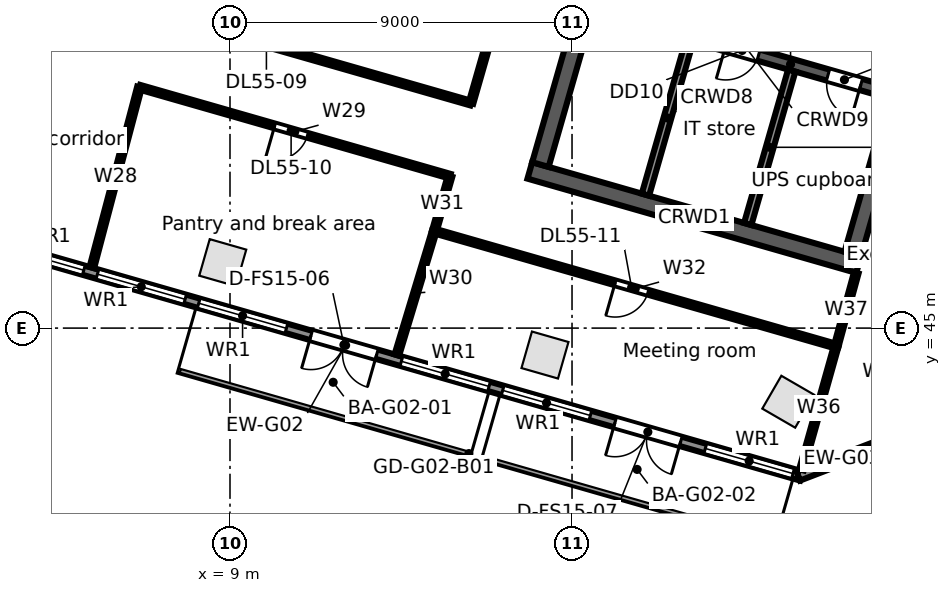
"""IFC4 building model, lengths in metres.
Left out: names, types, materials, properties, quantities, classifications, styles, units other than length and angle.
Written with IfcOpenShell. Run it as: python <this file> out.ifc"""

import sys

from ifc_helpers import new_model, si_unit, direction, frame, frame_2d, origin, origin_2d, place, context, subcontext, project, spatial, rectangle, extrude, element, fill, save


model = new_model("IFC4")
c1 = context("Model", 3, precision=1e-05, world=origin(), true_north=direction((0.0, 1.0)))
c2 = subcontext(c1, "Body", "Model", "MODEL_VIEW")
j1 = project(units=[si_unit("LENGTHUNIT", "METRE"), si_unit("PLANEANGLEUNIT", "RADIAN")], contexts=[c1])
p1 = place(None, origin())
s1 = spatial("IfcSite", under=j1, at=p1, CompositionType="ELEMENT")
p2 = place(p1, origin())
s2 = spatial("IfcBuilding", under=s1, at=p2, CompositionType="ELEMENT")
p3 = place(p2, frame((0.0, 0.0, 250.4)))
s3 = spatial("IfcBuildingStorey", under=s2, at=p3, CompositionType="ELEMENT", Elevation=250.4)
for number, where, z_axis, x_axis in (
    (1, (8.81, 46.722, 0.0), (0.0, 0.0, 1.0), (0.961, -0.276, 0.0)),
    (2, (17.288, 44.291, 0.0), (0.0, 0.0, 1.0), (0.961, -0.276, 0.0)),
    (3, (23.69, 43.063, 0.0), (0.0, 0.0, 1.0), (-0.865, 0.501, 0.0)),
):
    element("IfcColumn", number, at=place(p3, frame(where, z_axis=z_axis, x_axis=x_axis)), inside=s3, PredefinedType="COLUMN", context=c2, shape_type="SweptSolid", body=[
        extrude(rectangle(XDim=1.0, YDim=1.0, at=origin_2d()), origin(), (0.0, 0.0, 1.0), 3.9),
    ])
p4 = place(p3, frame((24.034, 41.108, 0.0), z_axis=(0.0, 0.0, 1.0), x_axis=(-0.96126060691, 0.275641153683, 0.0)))
e4 = element("IfcWall", 4, at=p4, inside=s3, PredefinedType="STANDARD", context=c2, shape_type="SweptSolid", body=[
    extrude(rectangle(XDim=24.951, YDim=0.25, at=frame_2d((12.475, 0.0))), origin(), (0.0, 0.0, 1.0), 3.62),
])
p5 = place(p4, frame((22.416, 0.0, 0.8)))
e5 = element("IfcOpeningElement", 5, at=p5, cuts=e4, PredefinedType="OPENING", context=c2, shape_type="SweptSolid", body=[
    extrude(rectangle(XDim=2.4, YDim=2.2, at=frame_2d((1.2, 1.1))), frame((0.0, 0.135, 0.0), z_axis=(0.0, -1.0, 0.0), x_axis=(1.0, 0.0, 0.0)), (0.0, 0.0, 1.0), 0.27),
])
p6 = place(p4, frame((19.643, 0.0, 0.8)))
e6 = element("IfcOpeningElement", 6, at=p6, cuts=e4, PredefinedType="OPENING", context=c2, shape_type="SweptSolid", body=[
    extrude(rectangle(XDim=2.4, YDim=2.2, at=frame_2d((1.2, 1.1))), frame((0.0, 0.135, 0.0), z_axis=(0.0, -1.0, 0.0), x_axis=(1.0, 0.0, 0.0)), (0.0, 0.0, 1.0), 0.27),
])
p7 = place(p4, frame((16.869, 0.0, 0.8)))
e7 = element("IfcOpeningElement", 7, at=p7, cuts=e4, PredefinedType="OPENING", context=c2, shape_type="SweptSolid", body=[
    extrude(rectangle(XDim=2.4, YDim=2.2, at=frame_2d((1.2, 1.1))), frame((0.0, 0.135, 0.0), z_axis=(0.0, -1.0, 0.0), x_axis=(1.0, 0.0, 0.0)), (0.0, 0.0, 1.0), 0.27),
])
p8 = place(p4, frame((14.096, 0.0, 0.8)))
e8 = element("IfcOpeningElement", 8, at=p8, cuts=e4, PredefinedType="OPENING", context=c2, shape_type="SweptSolid", body=[
    extrude(rectangle(XDim=2.4, YDim=2.2, at=frame_2d((1.2, 1.1))), frame((0.0, 0.135, 0.0), z_axis=(0.0, -1.0, 0.0), x_axis=(1.0, 0.0, 0.0)), (0.0, 0.0, 1.0), 0.27),
])
p9 = place(p4, frame((11.622, 0.0, 0.0)))
e9 = element("IfcOpeningElement", 9, at=p9, cuts=e4, PredefinedType="OPENING", context=c2, shape_type="SweptSolid", body=[
    extrude(rectangle(XDim=1.8, YDim=2.4, at=frame_2d((0.9, 1.2))), frame((0.0, 0.135, 0.0), z_axis=(0.0, -1.0, 0.0), x_axis=(1.0, 0.0, 0.0)), (0.0, 0.0, 1.0), 0.27),
])
p10 = place(p4, frame((8.549, 0.0, 0.8)))
e10 = element("IfcOpeningElement", 10, at=p10, cuts=e4, PredefinedType="OPENING", context=c2, shape_type="SweptSolid", body=[
    extrude(rectangle(XDim=2.4, YDim=2.2, at=frame_2d((1.2, 1.1))), frame((0.0, 0.135, 0.0), z_axis=(0.0, -1.0, 0.0), x_axis=(1.0, 0.0, 0.0)), (0.0, 0.0, 1.0), 0.27),
])
p11 = place(p4, frame((5.775, 0.0, 0.8)))
e11 = element("IfcOpeningElement", 11, at=p11, cuts=e4, PredefinedType="OPENING", context=c2, shape_type="SweptSolid", body=[
    extrude(rectangle(XDim=2.4, YDim=2.2, at=frame_2d((1.2, 1.1))), frame((0.0, 0.135, 0.0), z_axis=(0.0, -1.0, 0.0), x_axis=(1.0, 0.0, 0.0)), (0.0, 0.0, 1.0), 0.27),
])
p12 = place(p4, frame((3.302, 0.0, 0.0)))
e12 = element("IfcOpeningElement", 12, at=p12, cuts=e4, PredefinedType="OPENING", context=c2, shape_type="SweptSolid", body=[
    extrude(rectangle(XDim=1.8, YDim=2.4, at=frame_2d((0.9, 1.2))), frame((0.0, 0.135, 0.0), z_axis=(0.0, -1.0, 0.0), x_axis=(1.0, 0.0, 0.0)), (0.0, 0.0, 1.0), 0.27),
])
p13 = place(p4, frame((0.229, 0.0, 0.8)))
e13 = element("IfcOpeningElement", 13, at=p13, cuts=e4, PredefinedType="OPENING", context=c2, shape_type="SweptSolid", body=[
    extrude(rectangle(XDim=2.4, YDim=2.2, at=frame_2d((1.2, 1.1))), frame((0.0, 0.135, 0.0), z_axis=(0.0, -1.0, 0.0), x_axis=(1.0, 0.0, 0.0)), (0.0, 0.0, 1.0), 0.27),
])
p14 = place(p3, frame((26.27, 41.993, 0.0), z_axis=(0.0, 0.0, 1.0), x_axis=(-0.933573798066, -0.358385216722, 0.0)))
e14 = element("IfcWall", 14, at=p14, inside=s3, PredefinedType="STANDARD", context=c2, shape_type="SweptSolid", body=[
    extrude(rectangle(XDim=2.48, YDim=0.25, at=frame_2d((1.24, 0.0))), origin(), (0.0, 0.0, 1.0), 3.62),
])
p15 = place(p3, frame((16.89, 49.149, 0.0), z_axis=(0.0, 0.0, 1.0), x_axis=(0.96126248289, -0.275634611374, 0.0)))
e15 = element("IfcWall", 15, at=p15, inside=s3, PredefinedType="SOLIDWALL", context=c2, shape_type="SweptSolid", body=[
    extrude(rectangle(XDim=9.0, YDim=0.45, at=frame_2d((4.5, 0.0))), origin(), (0.0, 0.0, 1.0), 3.62),
])
p16 = place(p3, frame((21.131, 52.692, 0.0), z_axis=(0.0, 0.0, 1.0), x_axis=(0.961261488075, -0.275638080722, 0.0)))
e16 = element("IfcWall", 16, at=p16, inside=s3, PredefinedType="SOLIDWALL", context=c2, shape_type="SweptSolid", body=[
    extrude(rectangle(XDim=5.45, YDim=0.3, at=frame_2d((2.725, 0.0))), origin(), (0.0, 0.0, 1.0), 3.62),
])
p17 = place(p16, frame((0.95, 0.0, 0.0)))
e17 = element("IfcOpeningElement", 17, at=p17, cuts=e16, PredefinedType="OPENING", context=c2, shape_type="SweptSolid", body=[
    extrude(rectangle(XDim=0.9, YDim=2.1, at=frame_2d((0.45, 1.05))), frame((0.0, 0.16, 0.0), z_axis=(0.0, -1.0, 0.0), x_axis=(1.0, 0.0, 0.0)), (0.0, 0.0, 1.0), 0.32),
])
p18 = place(p16, frame((3.75, 0.0, 0.0)))
e18 = element("IfcOpeningElement", 18, at=p18, cuts=e16, PredefinedType="OPENING", context=c2, shape_type="SweptSolid", body=[
    extrude(rectangle(XDim=0.9, YDim=2.1, at=frame_2d((0.45, 1.05))), frame((0.0, 0.16, 0.0), z_axis=(0.0, -1.0, 0.0), x_axis=(1.0, 0.0, 0.0)), (0.0, 0.0, 1.0), 0.32),
])
p19 = place(p3, frame((17.168, 49.303, 0.0), z_axis=(0.0, 0.0, 1.0), x_axis=(0.275638974822, 0.961261231695, 0.0)))
e19 = element("IfcWall", 19, at=p19, inside=s3, PredefinedType="SOLIDWALL", context=c2, shape_type="SweptSolid", body=[
    extrude(rectangle(XDim=11.1, YDim=0.45, at=frame_2d((5.55, 0.0))), origin(), (0.0, 0.0, 1.0), 3.62),
])
p20 = place(p19, frame((4.95, 0.0, 0.0)))
e20 = element("IfcOpeningElement", 20, at=p20, cuts=e19, PredefinedType="OPENING", context=c2, shape_type="SweptSolid", body=[
    extrude(rectangle(XDim=1.2, YDim=2.1, at=frame_2d((0.6, 1.05))), frame((0.0, 0.235, 0.0), z_axis=(0.0, -1.0, 0.0), x_axis=(1.0, 0.0, 0.0)), (0.0, 0.0, 1.0), 0.47),
])
p21 = place(p3, frame((19.932, 48.511, 0.0), z_axis=(0.0, 0.0, 1.0), x_axis=(0.275642273411, 0.961260285827, 0.0)))
e21 = element("IfcWall", 21, at=p21, inside=s3, PredefinedType="SOLIDWALL", context=c2, shape_type="SweptSolid", body=[
    extrude(rectangle(XDim=4.2, YDim=0.2, at=frame_2d((2.1, 0.0))), origin(), (0.0, 0.0, 1.0), 3.62),
])
p22 = place(p3, frame((22.623, 47.739, 0.0), z_axis=(0.0, 0.0, 1.0), x_axis=(0.275642273411, 0.961260285827, 0.0)))
e22 = element("IfcWall", 22, at=p22, inside=s3, PredefinedType="PARTITIONING", context=c2, shape_type="SweptSolid", body=[
    extrude(rectangle(XDim=4.2, YDim=0.2, at=frame_2d((2.1, 0.0))), origin(), (0.0, 0.0, 1.0), 3.62),
])
p23 = place(p3, frame((25.387, 46.947, 0.0), z_axis=(0.0, 0.0, 1.0), x_axis=(0.275638974822, 0.961261231695, 0.0)))
e23 = element("IfcWall", 23, at=p23, inside=s3, PredefinedType="SOLIDWALL", context=c2, shape_type="SweptSolid", body=[
    extrude(rectangle(XDim=11.1, YDim=0.45, at=frame_2d((5.55, 0.0))), origin(), (0.0, 0.0, 1.0), 3.62),
])
p24 = place(p23, frame((4.95, 0.0, 0.0)))
e24 = element("IfcOpeningElement", 24, at=p24, cuts=e23, PredefinedType="OPENING", context=c2, shape_type="SweptSolid", body=[
    extrude(rectangle(XDim=1.2, YDim=2.1, at=frame_2d((0.6, 1.05))), frame((0.0, 0.235, 0.0), z_axis=(0.0, -1.0, 0.0), x_axis=(1.0, 0.0, 0.0)), (0.0, 0.0, 1.0), 0.47),
])
p25 = place(p3, frame((4.527, 54.02, 0.0), z_axis=(0.0, 0.0, 1.0), x_axis=(0.961279520283, -0.275575187352, 0.0)))
e25 = element("IfcWall", 25, at=p25, inside=s3, PredefinedType="PARTITIONING", context=c2, shape_type="SweptSolid", body=[
    extrude(rectangle(XDim=11.25, YDim=0.125, at=frame_2d((5.625, 0.0))), origin(), (0.0, 0.0, 1.0), 2.8),
])
p26 = place(p25, frame((5.2, 0.0, 0.0)))
e26 = element("IfcOpeningElement", 26, at=p26, cuts=e25, PredefinedType="OPENING", context=c2, shape_type="SweptSolid", body=[
    extrude(rectangle(XDim=0.9, YDim=2.1, at=frame_2d((0.45, 1.05))), frame((0.0, 0.073, 0.0), z_axis=(0.0, -1.0, 0.0), x_axis=(1.0, 0.0, 0.0)), (0.0, 0.0, 1.0), 0.145),
])
p27 = place(p3, frame((5.364, 46.592, 0.0), z_axis=(0.0, 0.0, 1.0), x_axis=(0.255520885185, 0.966803536006, 0.0)))
e27 = element("IfcWall", 27, at=p27, inside=s3, PredefinedType="PARTITIONING", context=c2, shape_type="SweptSolid", body=[
    extrude(rectangle(XDim=4.911, YDim=0.125, at=frame_2d((2.456, 0.0))), origin(), (0.0, 0.0, 1.0), 2.988),
])
p28 = place(p3, frame((6.619, 51.34, 0.0), z_axis=(0.0, 0.0, 1.0), x_axis=(0.961262314742, -0.275635197782, 0.0)))
e28 = element("IfcWall", 28, at=p28, inside=s3, PredefinedType="PARTITIONING", context=c2, shape_type="SweptSolid", body=[
    extrude(rectangle(XDim=8.5, YDim=0.125, at=frame_2d((4.25, 0.0))), origin(), (0.0, 0.0, 1.0), 2.8),
])
p29 = place(p28, frame((3.7, 0.0, 0.0)))
e29 = element("IfcOpeningElement", 29, at=p29, cuts=e28, PredefinedType="OPENING", context=c2, shape_type="SweptSolid", body=[
    extrude(rectangle(XDim=0.9, YDim=2.1, at=frame_2d((0.45, 1.05))), frame((0.0, 0.073, 0.0), z_axis=(0.0, -1.0, 0.0), x_axis=(1.0, 0.0, 0.0)), (0.0, 0.0, 1.0), 0.145),
])
p30 = place(p3, frame((13.39, 44.29, 0.0), z_axis=(0.0, 0.0, 1.0), x_axis=(0.289389501276, 0.957211427299, 0.0)))
e30 = element("IfcWall", 30, at=p30, inside=s3, PredefinedType="PARTITIONING", context=c2, shape_type="SweptSolid", body=[
    extrude(rectangle(XDim=3.411, YDim=0.125, at=frame_2d((1.706, 0.0))), origin(), (0.0, 0.0, 1.0), 2.994),
])
p31 = place(p3, frame((14.377, 47.555, 0.0), z_axis=(0.0, 0.0, 1.0), x_axis=(0.275365908, 0.961339490873, 0.0)))
e31 = element("IfcWall", 31, at=p31, inside=s3, PredefinedType="PARTITIONING", context=c2, shape_type="SweptSolid", body=[
    extrude(rectangle(XDim=1.5, YDim=0.125, at=frame_2d((0.75, 0.0))), origin(), (0.0, 0.0, 1.0), 3.62),
])
p32 = place(p3, frame((14.377, 47.555, 0.0), z_axis=(0.0, 0.0, 1.0), x_axis=(0.961263044958, -0.275632651182, 0.0)))
e32 = element("IfcWall", 32, at=p32, inside=s3, PredefinedType="PARTITIONING", context=c2, shape_type="SweptSolid", body=[
    extrude(rectangle(XDim=11.0, YDim=0.125, at=frame_2d((5.5, 0.0))), origin(), (0.0, 0.0, 1.0), 2.9),
])
p33 = place(p32, frame((4.95, 0.0, 0.0)))
e33 = element("IfcOpeningElement", 33, at=p33, cuts=e32, PredefinedType="OPENING", context=c2, shape_type="SweptSolid", body=[
    extrude(rectangle(XDim=0.9, YDim=2.1, at=frame_2d((0.45, 1.05))), frame((0.0, 0.073, 0.0), z_axis=(0.0, -1.0, 0.0), x_axis=(1.0, 0.0, 0.0)), (0.0, 0.0, 1.0), 0.145),
])
p34 = place(p3, frame((15.341, 50.92, 0.0), z_axis=(0.0, 0.0, 1.0), x_axis=(0.275653309838, 0.961257121053, 0.0)))
e34 = element("IfcWall", 34, at=p34, inside=s3, PredefinedType="PARTITIONING", context=c2, shape_type="SweptSolid", body=[
    extrude(rectangle(XDim=5.499, YDim=0.125, at=frame_2d((2.75, 0.0))), origin(), (0.0, 0.0, 1.0), 2.8),
])
p35 = place(p3, frame((24.036, 41.27, 0.0), z_axis=(0.0, 0.0, 1.0), x_axis=(0.270787421954, 0.962639170256, 0.0)))
e35 = element("IfcWall", 35, at=p35, inside=s3, PredefinedType="PARTITIONING", context=c2, shape_type="SweptSolid", body=[
    extrude(rectangle(XDim=3.379, YDim=0.125, at=frame_2d((1.689, 0.0))), origin(), (0.0, 0.0, 1.0), 2.9),
])
p36 = place(p3, frame((24.951, 44.523, 0.0), z_axis=(0.0, 0.0, 1.0), x_axis=(0.264046927145, 0.964509834198, 0.0)))
e36 = element("IfcWall", 36, at=p36, inside=s3, PredefinedType="PARTITIONING", context=c2, shape_type="SweptSolid", body=[
    extrude(rectangle(XDim=2.0, YDim=0.125, at=frame_2d((1.0, 0.0))), origin(), (0.0, 0.0, 1.0), 2.9),
])
p37 = place(p6, origin())
e37 = element("IfcWindow", 37, at=p37, inside=s3, PartitioningType="SINGLE_PANEL", PredefinedType="WINDOW", context=c2, shape_type="SweptSolid", body=[
    extrude(rectangle(XDim=2.4, YDim=2.2, at=frame_2d((1.2, 1.1))), frame((0.0, 0.03, 0.0), z_axis=(0.0, -1.0, 0.0), x_axis=(1.0, 0.0, 0.0)), (0.0, 0.0, 1.0), 0.06),
])
fill(e6, e37)
p38 = place(p7, origin())
e38 = element("IfcWindow", 38, at=p38, inside=s3, PartitioningType="SINGLE_PANEL", PredefinedType="WINDOW", context=c2, shape_type="SweptSolid", body=[
    extrude(rectangle(XDim=2.4, YDim=2.2, at=frame_2d((1.2, 1.1))), frame((0.0, 0.03, 0.0), z_axis=(0.0, -1.0, 0.0), x_axis=(1.0, 0.0, 0.0)), (0.0, 0.0, 1.0), 0.06),
])
fill(e7, e38)
p39 = place(p8, origin())
e39 = element("IfcWindow", 39, at=p39, inside=s3, PartitioningType="SINGLE_PANEL", PredefinedType="WINDOW", context=c2, shape_type="SweptSolid", body=[
    extrude(rectangle(XDim=2.4, YDim=2.2, at=frame_2d((1.2, 1.1))), frame((0.0, 0.03, 0.0), z_axis=(0.0, -1.0, 0.0), x_axis=(1.0, 0.0, 0.0)), (0.0, 0.0, 1.0), 0.06),
])
fill(e8, e39)
p40 = place(p9, origin())
e40 = element("IfcDoor", 40, at=p40, inside=s3, OperationType="DOUBLE_DOOR_SINGLE_SWING", PredefinedType="DOOR", context=c2, shape_type="SweptSolid", body=[
    extrude(rectangle(XDim=1.8, YDim=2.4, at=frame_2d((0.9, 1.2))), frame((0.0, 0.025, 0.0), z_axis=(0.0, -1.0, 0.0), x_axis=(1.0, 0.0, 0.0)), (0.0, 0.0, 1.0), 0.05),
])
fill(e9, e40)
p41 = place(p10, origin())
e41 = element("IfcWindow", 41, at=p41, inside=s3, PartitioningType="SINGLE_PANEL", PredefinedType="WINDOW", context=c2, shape_type="SweptSolid", body=[
    extrude(rectangle(XDim=2.4, YDim=2.2, at=frame_2d((1.2, 1.1))), frame((0.0, 0.03, 0.0), z_axis=(0.0, -1.0, 0.0), x_axis=(1.0, 0.0, 0.0)), (0.0, 0.0, 1.0), 0.06),
])
fill(e10, e41)
p42 = place(p11, origin())
e42 = element("IfcWindow", 42, at=p42, inside=s3, PartitioningType="SINGLE_PANEL", PredefinedType="WINDOW", context=c2, shape_type="SweptSolid", body=[
    extrude(rectangle(XDim=2.4, YDim=2.2, at=frame_2d((1.2, 1.1))), frame((0.0, 0.03, 0.0), z_axis=(0.0, -1.0, 0.0), x_axis=(1.0, 0.0, 0.0)), (0.0, 0.0, 1.0), 0.06),
])
fill(e11, e42)
p43 = place(p12, origin())
e43 = element("IfcDoor", 43, at=p43, inside=s3, OperationType="DOUBLE_DOOR_SINGLE_SWING", PredefinedType="DOOR", context=c2, shape_type="SweptSolid", body=[
    extrude(rectangle(XDim=1.8, YDim=2.4, at=frame_2d((0.9, 1.2))), frame((0.0, 0.025, 0.0), z_axis=(0.0, -1.0, 0.0), x_axis=(1.0, 0.0, 0.0)), (0.0, 0.0, 1.0), 0.05),
])
fill(e12, e43)
p44 = place(p13, origin())
e44 = element("IfcWindow", 44, at=p44, inside=s3, PartitioningType="SINGLE_PANEL", PredefinedType="WINDOW", context=c2, shape_type="SweptSolid", body=[
    extrude(rectangle(XDim=2.4, YDim=2.2, at=frame_2d((1.2, 1.1))), frame((0.0, 0.03, 0.0), z_axis=(0.0, -1.0, 0.0), x_axis=(1.0, 0.0, 0.0)), (0.0, 0.0, 1.0), 0.06),
])
fill(e13, e44)
p45 = place(p17, frame((0.9, 0.0, 0.0), z_axis=(0.0, 0.0, 1.0), x_axis=(-1.0, 0.0, 0.0)))
e45 = element("IfcDoor", 45, at=p45, inside=s3, OperationType="SINGLE_SWING_RIGHT", PredefinedType="DOOR", context=c2, shape_type="SweptSolid", body=[
    extrude(rectangle(XDim=0.9, YDim=2.1, at=frame_2d((0.45, 1.05))), frame((0.0, 0.025, 0.0), z_axis=(0.0, -1.0, 0.0), x_axis=(1.0, 0.0, 0.0)), (0.0, 0.0, 1.0), 0.05),
])
fill(e17, e45)
p46 = place(p18, frame((0.9, 0.0, 0.0), z_axis=(0.0, 0.0, 1.0), x_axis=(-1.0, 0.0, 0.0)))
e46 = element("IfcDoor", 46, at=p46, inside=s3, OperationType="SINGLE_SWING_LEFT", PredefinedType="DOOR", context=c2, shape_type="SweptSolid", body=[
    extrude(rectangle(XDim=0.9, YDim=2.1, at=frame_2d((0.45, 1.05))), frame((0.0, 0.025, 0.0), z_axis=(0.0, -1.0, 0.0), x_axis=(1.0, 0.0, 0.0)), (0.0, 0.0, 1.0), 0.05),
])
fill(e18, e46)
p47 = place(p29, frame((0.9, 0.0, 0.0), z_axis=(0.0, 0.0, 1.0), x_axis=(-1.0, 0.0, 0.0)))
e47 = element("IfcDoor", 47, at=p47, inside=s3, OperationType="SINGLE_SWING_RIGHT", PredefinedType="DOOR", context=c2, shape_type="SweptSolid", body=[
    extrude(rectangle(XDim=0.9, YDim=2.1, at=frame_2d((0.45, 1.05))), frame((0.0, 0.025, 0.0), z_axis=(0.0, -1.0, 0.0), x_axis=(1.0, 0.0, 0.0)), (0.0, 0.0, 1.0), 0.05),
])
fill(e29, e47)
p48 = place(p33, frame((0.9, 0.0, 0.0), z_axis=(0.0, 0.0, 1.0), x_axis=(-1.0, 0.0, 0.0)))
e48 = element("IfcDoor", 48, at=p48, inside=s3, OperationType="SINGLE_SWING_RIGHT", PredefinedType="DOOR", context=c2, shape_type="SweptSolid", body=[
    extrude(rectangle(XDim=0.9, YDim=2.1, at=frame_2d((0.45, 1.05))), frame((0.0, 0.025, 0.0), z_axis=(0.0, -1.0, 0.0), x_axis=(1.0, 0.0, 0.0)), (0.0, 0.0, 1.0), 0.05),
])
fill(e33, e48)
save(model, sys.argv[1])
